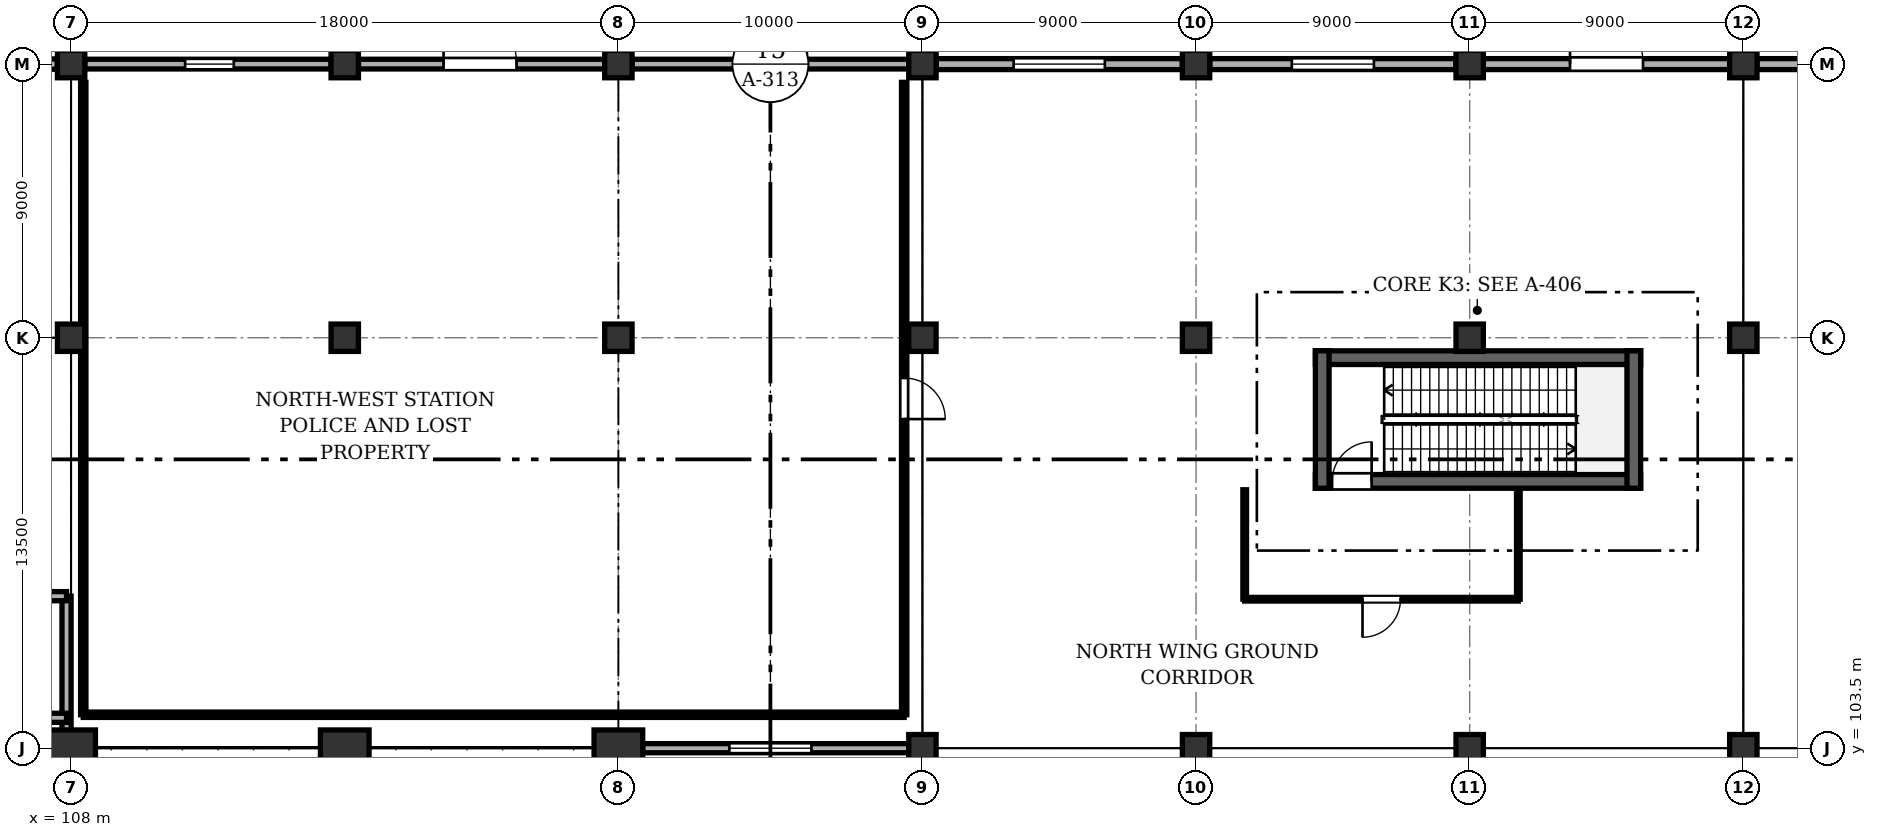
"""IFC4 building model, lengths in metres.
Left out: names, types, materials, properties, quantities, classifications, styles, units other than length and angle.
Written with IfcOpenShell. Run it as: python <this file> out.ifc"""

import sys

from ifc_helpers import new_model, si_unit, direction, frame, frame_2d, origin, origin_2d, place, context, subcontext, project, spatial, rectangle, extrude, element, fill, save


model = new_model("IFC4")
c1 = context("Model", 3, precision=1e-05, world=origin(), true_north=direction((0.0, 1.0)))
c2 = subcontext(c1, "Body", "Model", "MODEL_VIEW")
j1 = project(units=[si_unit("LENGTHUNIT", "METRE"), si_unit("PLANEANGLEUNIT", "RADIAN")], contexts=[c1])
p1 = place(None, origin())
s1 = spatial("IfcSite", under=j1, at=p1, CompositionType="ELEMENT")
p2 = place(p1, origin())
s2 = spatial("IfcBuilding", under=s1, at=p2, CompositionType="ELEMENT")
p3 = place(p2, origin())
s3 = spatial("IfcBuildingStorey", under=s2, at=p3, CompositionType="ELEMENT", Elevation=0.0)
p4 = place(p3, frame((108.0, 103.5, 0.0), z_axis=(0.0, 0.0, 1.0), x_axis=(1.0, 0.0, 0.0)))
e1 = element("IfcColumn", 1, at=p4, inside=s3, PredefinedType="COLUMN", context=c2, shape_type="SweptSolid", body=[
    extrude(rectangle(XDim=1.6, YDim=1.2, at=origin_2d()), origin(), (0.0, 0.0, 1.0), 6.6),
])
for number, where, z_axis, x_axis in (
    (2, (108.0, 117.0, 0.0), (0.0, 0.0, 1.0), (1.0, 0.0, 0.0)),
    (3, (108.0, 126.0, 0.0), (0.0, 0.0, 1.0), (1.0, 0.0, 0.0)),
):
    element("IfcColumn", number, at=place(p3, frame(where, z_axis=z_axis, x_axis=x_axis)), inside=s3, PredefinedType="COLUMN", context=c2, shape_type="SweptSolid", body=[
        extrude(rectangle(XDim=0.9, YDim=0.9, at=origin_2d()), origin(), (0.0, 0.0, 1.0), 6.6),
    ])
p5 = place(p3, frame((117.0, 103.5, 0.0), z_axis=(0.0, 0.0, 1.0), x_axis=(1.0, 0.0, 0.0)))
e4 = element("IfcColumn", 4, at=p5, inside=s3, PredefinedType="COLUMN", context=c2, shape_type="SweptSolid", body=[
    extrude(rectangle(XDim=1.6, YDim=1.2, at=origin_2d()), origin(), (0.0, 0.0, 1.0), 6.6),
])
for number, where, z_axis, x_axis in (
    (5, (117.0, 117.0, 0.0), (0.0, 0.0, 1.0), (1.0, 0.0, 0.0)),
    (6, (117.0, 126.0, 0.0), (0.0, 0.0, 1.0), (1.0, 0.0, 0.0)),
):
    element("IfcColumn", number, at=place(p3, frame(where, z_axis=z_axis, x_axis=x_axis)), inside=s3, PredefinedType="COLUMN", context=c2, shape_type="SweptSolid", body=[
        extrude(rectangle(XDim=0.9, YDim=0.9, at=origin_2d()), origin(), (0.0, 0.0, 1.0), 6.6),
    ])
p6 = place(p3, frame((126.0, 103.5, 0.0), z_axis=(0.0, 0.0, 1.0), x_axis=(1.0, 0.0, 0.0)))
e7 = element("IfcColumn", 7, at=p6, inside=s3, PredefinedType="COLUMN", context=c2, shape_type="SweptSolid", body=[
    extrude(rectangle(XDim=1.6, YDim=1.2, at=origin_2d()), origin(), (0.0, 0.0, 1.0), 6.6),
])
for number, where, z_axis, x_axis in (
    (8, (126.0, 117.0, 0.0), (0.0, 0.0, 1.0), (1.0, 0.0, 0.0)),
    (9, (126.0, 126.0, 0.0), (0.0, 0.0, 1.0), (1.0, 0.0, 0.0)),
    (10, (136.0, 103.5, 0.0), (0.0, 0.0, 1.0), (1.0, 0.0, 0.0)),
    (11, (136.0, 117.0, 0.0), (0.0, 0.0, 1.0), (1.0, 0.0, 0.0)),
    (12, (136.0, 126.0, 0.0), (0.0, 0.0, 1.0), (1.0, 0.0, 0.0)),
    (13, (145.0, 103.5, 0.0), (0.0, 0.0, 1.0), (1.0, 0.0, 0.0)),
    (14, (145.0, 117.0, 0.0), (0.0, 0.0, 1.0), (1.0, 0.0, 0.0)),
    (15, (145.0, 126.0, 0.0), (0.0, 0.0, 1.0), (1.0, 0.0, 0.0)),
    (16, (154.0, 103.5, 0.0), (0.0, 0.0, 1.0), (1.0, 0.0, 0.0)),
    (17, (154.0, 117.0, 0.0), (0.0, 0.0, 1.0), (1.0, 0.0, 0.0)),
    (18, (154.0, 126.0, 0.0), (0.0, 0.0, 1.0), (1.0, 0.0, 0.0)),
    (19, (163.0, 103.5, 0.0), (0.0, 0.0, 1.0), (1.0, 0.0, 0.0)),
    (20, (163.0, 117.0, 0.0), (0.0, 0.0, 1.0), (1.0, 0.0, 0.0)),
    (21, (163.0, 126.0, 0.0), (0.0, 0.0, 1.0), (1.0, 0.0, 0.0)),
):
    element("IfcColumn", number, at=place(p3, frame(where, z_axis=z_axis, x_axis=x_axis)), inside=s3, PredefinedType="COLUMN", context=c2, shape_type="SweptSolid", body=[
        extrude(rectangle(XDim=0.9, YDim=0.9, at=origin_2d()), origin(), (0.0, 0.0, 1.0), 6.6),
    ])
p7 = place(p3, frame((107.85, 103.5, -1.25), z_axis=(0.0, 0.0, 1.0), x_axis=(0.0, 1.0, 0.0)))
e22 = element("IfcWall", 22, at=p7, inside=s3, PredefinedType="SOLIDWALL", context=c2, shape_type="SweptSolid", body=[
    extrude(rectangle(XDim=5.0, YDim=0.3, at=frame_2d((2.5, 0.0))), origin(), (0.0, 0.0, 1.0), 2.5),
])
for number, where, z_axis, x_axis in (
    (23, (0.15, 104.5, -1.25), (0.0, 0.0, 1.0), (1.0, 0.0, 0.0)),
    (24, (0.15, 108.5, -1.25), (0.0, 0.0, 1.0), (1.0, 0.0, 0.0)),
):
    element("IfcWall", number, at=place(p3, frame(where, z_axis=z_axis, x_axis=x_axis)), inside=s3, PredefinedType="SOLIDWALL", context=c2, shape_type="SweptSolid", body=[
        extrude(rectangle(XDim=107.7, YDim=0.3, at=frame_2d((53.85, 0.0))), origin(), (0.0, 0.0, 1.0), 0.87),
    ])
p8 = place(p3, frame((99.3, 126.0, 0.0), z_axis=(0.0, 0.0, 1.0), x_axis=(1.0, 0.0, 0.0)))
e25 = element("IfcWall", 25, at=p8, inside=s3, PredefinedType="SOLIDWALL", context=c2, shape_type="SweptSolid", body=[
    extrude(rectangle(XDim=8.25, YDim=0.34, at=frame_2d((4.125, 0.0))), origin(), (0.0, 0.0, 1.0), 5.79),
])
p9 = place(p8, frame((3.25, 0.0, 0.0)))
e26 = element("IfcOpeningElement", 26, at=p9, cuts=e25, PredefinedType="OPENING", context=c2, shape_type="SweptSolid", body=[
    extrude(rectangle(XDim=1.8, YDim=2.35, at=frame_2d((0.9, 1.175))), frame((0.0, 0.18, 0.0), z_axis=(0.0, -1.0, 0.0), x_axis=(1.0, 0.0, 0.0)), (0.0, 0.0, 1.0), 0.36),
])
p10 = place(p3, frame((108.45, 126.0, 0.0), z_axis=(0.0, 0.0, 1.0), x_axis=(1.0, 0.0, 0.0)))
e27 = element("IfcWall", 27, at=p10, inside=s3, PredefinedType="SOLIDWALL", context=c2, shape_type="SweptSolid", body=[
    extrude(rectangle(XDim=8.1, YDim=0.32, at=frame_2d((4.05, 0.0))), origin(), (0.0, 0.0, 1.0), 5.79),
])
p11 = place(p10, frame((3.3, 0.0, 0.95)))
e28 = element("IfcOpeningElement", 28, at=p11, cuts=e27, PredefinedType="OPENING", context=c2, shape_type="SweptSolid", body=[
    extrude(rectangle(XDim=1.6, YDim=1.9, at=frame_2d((0.8, 0.95))), frame((0.0, 0.17, 0.0), z_axis=(0.0, -1.0, 0.0), x_axis=(1.0, 0.0, 0.0)), (0.0, 0.0, 1.0), 0.34),
])
p12 = place(p3, frame((117.45, 126.0, 0.0), z_axis=(0.0, 0.0, 1.0), x_axis=(1.0, 0.0, 0.0)))
e29 = element("IfcWall", 29, at=p12, inside=s3, PredefinedType="SOLIDWALL", context=c2, shape_type="SweptSolid", body=[
    extrude(rectangle(XDim=8.1, YDim=0.32, at=frame_2d((4.05, 0.0))), origin(), (0.0, 0.0, 1.0), 5.855),
])
p13 = place(p12, frame((2.8, 0.0, 0.0)))
e30 = element("IfcOpeningElement", 30, at=p13, cuts=e29, PredefinedType="OPENING", context=c2, shape_type="SweptSolid", body=[
    extrude(rectangle(XDim=2.4, YDim=2.5, at=frame_2d((1.2, 1.25))), frame((0.0, 0.17, 0.0), z_axis=(0.0, -1.0, 0.0), x_axis=(1.0, 0.0, 0.0)), (0.0, 0.0, 1.0), 0.34),
])
p14 = place(p3, frame((126.45, 126.0, 0.0), z_axis=(0.0, 0.0, 1.0), x_axis=(1.0, 0.0, 0.0)))
e31 = element("IfcWall", 31, at=p14, inside=s3, PredefinedType="SOLIDWALL", context=c2, shape_type="SweptSolid", body=[
    extrude(rectangle(XDim=9.1, YDim=0.32, at=frame_2d((4.55, 0.0))), origin(), (0.0, 0.0, 1.0), 5.855),
])
p15 = place(p14, frame((3.35, 0.0, 0.0)))
e32 = element("IfcOpeningElement", 32, at=p15, cuts=e31, PredefinedType="OPENING", context=c2, shape_type="SweptSolid", body=[
    extrude(rectangle(XDim=2.4, YDim=2.5, at=frame_2d((1.2, 1.25))), frame((0.0, 0.17, 0.0), z_axis=(0.0, -1.0, 0.0), x_axis=(1.0, 0.0, 0.0)), (0.0, 0.0, 1.0), 0.34),
])
p16 = place(p3, frame((135.55, 103.5, 0.0), z_axis=(0.0, 0.0, 1.0), x_axis=(-1.0, 0.0, 0.0)))
e33 = element("IfcWall", 33, at=p16, inside=s3, PredefinedType="SOLIDWALL", context=c2, shape_type="SweptSolid", body=[
    extrude(rectangle(XDim=8.75, YDim=0.3, at=frame_2d((4.375, 0.0))), origin(), (0.0, 0.0, 1.0), 5.495),
])
p17 = place(p16, frame((3.2, 0.0, 0.95)))
e34 = element("IfcOpeningElement", 34, at=p17, cuts=e33, PredefinedType="OPENING", context=c2, shape_type="SweptSolid", body=[
    extrude(rectangle(XDim=2.7, YDim=2.1, at=frame_2d((1.35, 1.05))), frame((0.0, 0.16, 0.0), z_axis=(0.0, -1.0, 0.0), x_axis=(1.0, 0.0, 0.0)), (0.0, 0.0, 1.0), 0.32),
])
p18 = place(p3, frame((136.45, 126.0, 0.0), z_axis=(0.0, 0.0, 1.0), x_axis=(1.0, 0.0, 0.0)))
e35 = element("IfcWall", 35, at=p18, inside=s3, PredefinedType="SOLIDWALL", context=c2, shape_type="SweptSolid", body=[
    extrude(rectangle(XDim=8.1, YDim=0.36, at=frame_2d((4.05, 0.0))), origin(), (0.0, 0.0, 1.0), 5.855),
])
p19 = place(p18, frame((2.55, 0.0, 0.95)))
e36 = element("IfcOpeningElement", 36, at=p19, cuts=e35, PredefinedType="OPENING", context=c2, shape_type="SweptSolid", body=[
    extrude(rectangle(XDim=3.0, YDim=2.1, at=frame_2d((1.5, 1.05))), frame((0.0, 0.19, 0.0), z_axis=(0.0, -1.0, 0.0), x_axis=(1.0, 0.0, 0.0)), (0.0, 0.0, 1.0), 0.38),
])
p20 = place(p3, frame((145.45, 126.0, 0.0), z_axis=(0.0, 0.0, 1.0), x_axis=(1.0, 0.0, 0.0)))
e37 = element("IfcWall", 37, at=p20, inside=s3, PredefinedType="SOLIDWALL", context=c2, shape_type="SweptSolid", body=[
    extrude(rectangle(XDim=8.1, YDim=0.36, at=frame_2d((4.05, 0.0))), origin(), (0.0, 0.0, 1.0), 5.855),
])
p21 = place(p20, frame((2.7, 0.0, 0.95)))
e38 = element("IfcOpeningElement", 38, at=p21, cuts=e37, PredefinedType="OPENING", context=c2, shape_type="SweptSolid", body=[
    extrude(rectangle(XDim=2.7, YDim=2.1, at=frame_2d((1.35, 1.05))), frame((0.0, 0.19, 0.0), z_axis=(0.0, -1.0, 0.0), x_axis=(1.0, 0.0, 0.0)), (0.0, 0.0, 1.0), 0.38),
])
p22 = place(p3, frame((154.45, 126.0, 0.0), z_axis=(0.0, 0.0, 1.0), x_axis=(1.0, 0.0, 0.0)))
e39 = element("IfcWall", 39, at=p22, inside=s3, PredefinedType="SOLIDWALL", context=c2, shape_type="SweptSolid", body=[
    extrude(rectangle(XDim=8.1, YDim=0.36, at=frame_2d((4.05, 0.0))), origin(), (0.0, 0.0, 1.0), 5.875),
])
p23 = place(p22, frame((2.85, 0.0, 0.0)))
e40 = element("IfcOpeningElement", 40, at=p23, cuts=e39, PredefinedType="OPENING", context=c2, shape_type="SweptSolid", body=[
    extrude(rectangle(XDim=2.4, YDim=2.5, at=frame_2d((1.2, 1.25))), frame((0.0, 0.19, 0.0), z_axis=(0.0, -1.0, 0.0), x_axis=(1.0, 0.0, 0.0)), (0.0, 0.0, 1.0), 0.38),
])
p24 = place(p3, frame((163.45, 126.0, 0.0), z_axis=(0.0, 0.0, 1.0), x_axis=(1.0, 0.0, 0.0)))
e41 = element("IfcWall", 41, at=p24, inside=s3, PredefinedType="SOLIDWALL", context=c2, shape_type="SweptSolid", body=[
    extrude(rectangle(XDim=8.1, YDim=0.36, at=frame_2d((4.05, 0.0))), origin(), (0.0, 0.0, 1.0), 5.875),
])
p25 = place(p24, frame((2.85, 0.0, 0.0)))
e42 = element("IfcOpeningElement", 42, at=p25, cuts=e41, PredefinedType="OPENING", context=c2, shape_type="SweptSolid", body=[
    extrude(rectangle(XDim=2.4, YDim=2.5, at=frame_2d((1.2, 1.25))), frame((0.0, 0.19, 0.0), z_axis=(0.0, -1.0, 0.0), x_axis=(1.0, 0.0, 0.0)), (0.0, 0.0, 1.0), 0.38),
])
p26 = place(p3, frame((148.925, 112.275, 0.0), z_axis=(0.0, 0.0, 1.0), x_axis=(1.0, 0.0, 0.0)))
e43 = element("IfcWall", 43, at=p26, inside=s3, PredefinedType="SHEAR", context=c2, shape_type="SweptSolid", body=[
    extrude(rectangle(XDim=10.698, YDim=0.45, at=frame_2d((5.349, 0.0))), origin(), (0.0, 0.0, 1.0), 6.36),
])
p27 = place(p26, frame((0.55, 0.0, 0.0)))
e44 = element("IfcOpeningElement", 44, at=p27, cuts=e43, PredefinedType="OPENING", context=c2, shape_type="SweptSolid", body=[
    extrude(rectangle(XDim=1.3, YDim=2.1, at=frame_2d((0.65, 1.05))), frame((0.0, 0.235, 0.0), z_axis=(0.0, -1.0, 0.0), x_axis=(1.0, 0.0, 0.0)), (0.0, 0.0, 1.0), 0.47),
])
p28 = place(p3, frame((159.623, 116.345, 0.0), z_axis=(0.0, 0.0, 1.0), x_axis=(-1.0, 0.0, 0.0)))
e45 = element("IfcWall", 45, at=p28, inside=s3, PredefinedType="SHEAR", context=c2, shape_type="SweptSolid", body=[
    extrude(rectangle(XDim=10.698, YDim=0.45, at=frame_2d((5.349, 0.0))), origin(), (0.0, 0.0, 1.0), 6.36),
])
for number, where, z_axis, x_axis in (
    (46, (159.397, 112.05, 0.0), (0.0, 0.0, 1.0), (0.0, 1.0, 0.0)),
    (47, (149.15, 116.57, 0.0), (0.0, 0.0, 1.0), (0.0, -1.0, 0.0)),
):
    element("IfcWall", number, at=place(p3, frame(where, z_axis=z_axis, x_axis=x_axis)), inside=s3, PredefinedType="SHEAR", context=c2, shape_type="SweptSolid", body=[
        extrude(rectangle(XDim=4.52, YDim=0.45, at=frame_2d((2.26, 0.0))), origin(), (0.0, 0.0, 1.0), 6.36),
    ])
p29 = place(p3, frame((135.4, 104.6, 0.0), z_axis=(0.0, 0.0, 1.0), x_axis=(-1.0, 0.0, 0.0)))
e48 = element("IfcWall", 48, at=p29, inside=s3, PredefinedType="PARTITIONING", context=c2, shape_type="SweptSolid", body=[
    extrude(rectangle(XDim=27.0, YDim=0.175, at=frame_2d((13.5, 0.0))), origin(), (0.0, 0.0, 1.0), 4.4),
])
p30 = place(p3, frame((108.4, 104.6, 0.0), z_axis=(0.0, 0.0, 1.0), x_axis=(0.0, 1.0, 0.0)))
e49 = element("IfcWall", 49, at=p30, inside=s3, PredefinedType="PARTITIONING", context=c2, shape_type="SweptSolid", body=[
    extrude(rectangle(XDim=20.8, YDim=0.175, at=frame_2d((10.4, 0.0))), origin(), (0.0, 0.0, 1.0), 4.4),
])
p31 = place(p3, frame((135.4, 125.4, 0.0), z_axis=(0.0, 0.0, 1.0), x_axis=(0.0, -1.0, 0.0)))
e50 = element("IfcWall", 50, at=p31, inside=s3, PredefinedType="PARTITIONING", context=c2, shape_type="SweptSolid", body=[
    extrude(rectangle(XDim=20.8, YDim=0.175, at=frame_2d((10.4, 0.0))), origin(), (0.0, 0.0, 1.0), 4.4),
])
p32 = place(p31, frame((9.725, 0.0, 0.0)))
e51 = element("IfcOpeningElement", 51, at=p32, cuts=e50, PredefinedType="OPENING", context=c2, shape_type="SweptSolid", body=[
    extrude(rectangle(XDim=1.35, YDim=2.1, at=frame_2d((0.675, 1.05))), frame((0.0, 0.097, 0.0), z_axis=(0.0, -1.0, 0.0), x_axis=(1.0, 0.0, 0.0)), (0.0, 0.0, 1.0), 0.195),
])
p33 = place(p3, frame((155.6, 108.4, 0.0), z_axis=(0.0, 0.0, 1.0), x_axis=(-1.0, 0.0, 0.0)))
e52 = element("IfcWall", 52, at=p33, inside=s3, PredefinedType="PARTITIONING", context=c2, shape_type="SweptSolid", body=[
    extrude(rectangle(XDim=9.0, YDim=0.12, at=frame_2d((4.5, 0.0))), origin(), (0.0, 0.0, 1.0), 4.4),
])
p34 = place(p33, frame((3.875, 0.0, 0.0)))
e53 = element("IfcOpeningElement", 53, at=p34, cuts=e52, PredefinedType="OPENING", context=c2, shape_type="SweptSolid", body=[
    extrude(rectangle(XDim=1.25, YDim=2.1, at=frame_2d((0.625, 1.05))), frame((0.0, 0.07, 0.0), z_axis=(0.0, -1.0, 0.0), x_axis=(1.0, 0.0, 0.0)), (0.0, 0.0, 1.0), 0.14),
])
for number, where, z_axis, x_axis in (
    (54, (146.6, 108.4, 0.0), (0.0, 0.0, 1.0), (0.0, 1.0, 0.0)),
    (55, (155.6, 112.0, 0.0), (0.0, 0.0, 1.0), (0.0, -1.0, 0.0)),
):
    element("IfcWall", number, at=place(p3, frame(where, z_axis=z_axis, x_axis=x_axis)), inside=s3, PredefinedType="PARTITIONING", context=c2, shape_type="SweptSolid", body=[
        extrude(rectangle(XDim=3.6, YDim=0.12, at=frame_2d((1.8, 0.0))), origin(), (0.0, 0.0, 1.0), 4.4),
    ])
p35 = place(p11, origin())
e56 = element("IfcWindow", 56, at=p35, inside=s3, PartitioningType="SINGLE_PANEL", PredefinedType="WINDOW", context=c2, shape_type="SweptSolid", body=[
    extrude(rectangle(XDim=1.6, YDim=1.9, at=frame_2d((0.8, 0.95))), frame((0.0, 0.03, 0.0), z_axis=(0.0, -1.0, 0.0), x_axis=(1.0, 0.0, 0.0)), (0.0, 0.0, 1.0), 0.06),
])
fill(e28, e56)
p36 = place(p13, origin())
e57 = element("IfcDoor", 57, at=p36, inside=s3, OperationType="SINGLE_SWING_LEFT", PredefinedType="DOOR", context=c2, shape_type="SweptSolid", body=[
    extrude(rectangle(XDim=2.4, YDim=2.5, at=frame_2d((1.2, 1.25))), frame((0.0, 0.025, 0.0), z_axis=(0.0, -1.0, 0.0), x_axis=(1.0, 0.0, 0.0)), (0.0, 0.0, 1.0), 0.05),
])
fill(e30, e57)
p37 = place(p15, origin())
e58 = element("IfcDoor", 58, at=p37, inside=s3, OperationType="SINGLE_SWING_RIGHT", PredefinedType="DOOR", context=c2, shape_type="SweptSolid", body=[
    extrude(rectangle(XDim=2.4, YDim=2.5, at=frame_2d((1.2, 1.25))), frame((0.0, 0.025, 0.0), z_axis=(0.0, -1.0, 0.0), x_axis=(1.0, 0.0, 0.0)), (0.0, 0.0, 1.0), 0.05),
])
fill(e32, e58)
p38 = place(p17, origin())
e59 = element("IfcWindow", 59, at=p38, inside=s3, PartitioningType="SINGLE_PANEL", PredefinedType="WINDOW", context=c2, shape_type="SweptSolid", body=[
    extrude(rectangle(XDim=2.7, YDim=2.1, at=frame_2d((1.35, 1.05))), frame((0.0, 0.03, 0.0), z_axis=(0.0, -1.0, 0.0), x_axis=(1.0, 0.0, 0.0)), (0.0, 0.0, 1.0), 0.06),
])
fill(e34, e59)
p39 = place(p19, origin())
e60 = element("IfcWindow", 60, at=p39, inside=s3, PartitioningType="SINGLE_PANEL", PredefinedType="WINDOW", context=c2, shape_type="SweptSolid", body=[
    extrude(rectangle(XDim=3.0, YDim=2.1, at=frame_2d((1.5, 1.05))), frame((0.0, 0.03, 0.0), z_axis=(0.0, -1.0, 0.0), x_axis=(1.0, 0.0, 0.0)), (0.0, 0.0, 1.0), 0.06),
])
fill(e36, e60)
p40 = place(p21, origin())
e61 = element("IfcWindow", 61, at=p40, inside=s3, PartitioningType="SINGLE_PANEL", PredefinedType="WINDOW", context=c2, shape_type="SweptSolid", body=[
    extrude(rectangle(XDim=2.7, YDim=2.1, at=frame_2d((1.35, 1.05))), frame((0.0, 0.03, 0.0), z_axis=(0.0, -1.0, 0.0), x_axis=(1.0, 0.0, 0.0)), (0.0, 0.0, 1.0), 0.06),
])
fill(e38, e61)
p41 = place(p23, origin())
e62 = element("IfcDoor", 62, at=p41, inside=s3, OperationType="SINGLE_SWING_LEFT", PredefinedType="DOOR", context=c2, shape_type="SweptSolid", body=[
    extrude(rectangle(XDim=2.4, YDim=2.5, at=frame_2d((1.2, 1.25))), frame((0.0, 0.025, 0.0), z_axis=(0.0, -1.0, 0.0), x_axis=(1.0, 0.0, 0.0)), (0.0, 0.0, 1.0), 0.05),
])
fill(e40, e62)
p42 = place(p27, origin())
e63 = element("IfcDoor", 63, at=p42, inside=s3, OperationType="SINGLE_SWING_RIGHT", PredefinedType="DOOR", context=c2, shape_type="SweptSolid", body=[
    extrude(rectangle(XDim=1.3, YDim=2.1, at=frame_2d((0.65, 1.05))), frame((0.0, 0.025, 0.0), z_axis=(0.0, -1.0, 0.0), x_axis=(1.0, 0.0, 0.0)), (0.0, 0.0, 1.0), 0.05),
])
fill(e44, e63)
p43 = place(p32, origin())
e64 = element("IfcDoor", 64, at=p43, inside=s3, OperationType="SINGLE_SWING_RIGHT", PredefinedType="DOOR", context=c2, shape_type="SweptSolid", body=[
    extrude(rectangle(XDim=1.35, YDim=2.1, at=frame_2d((0.675, 1.05))), frame((0.0, 0.025, 0.0), z_axis=(0.0, -1.0, 0.0), x_axis=(1.0, 0.0, 0.0)), (0.0, 0.0, 1.0), 0.05),
])
fill(e51, e64)
p44 = place(p34, origin())
e65 = element("IfcDoor", 65, at=p44, inside=s3, OperationType="SINGLE_SWING_RIGHT", PredefinedType="DOOR", context=c2, shape_type="SweptSolid", body=[
    extrude(rectangle(XDim=1.25, YDim=2.1, at=frame_2d((0.625, 1.05))), frame((0.0, 0.025, 0.0), z_axis=(0.0, -1.0, 0.0), x_axis=(1.0, 0.0, 0.0)), (0.0, 0.0, 1.0), 0.05),
])
fill(e53, e65)
save(model, sys.argv[1])
